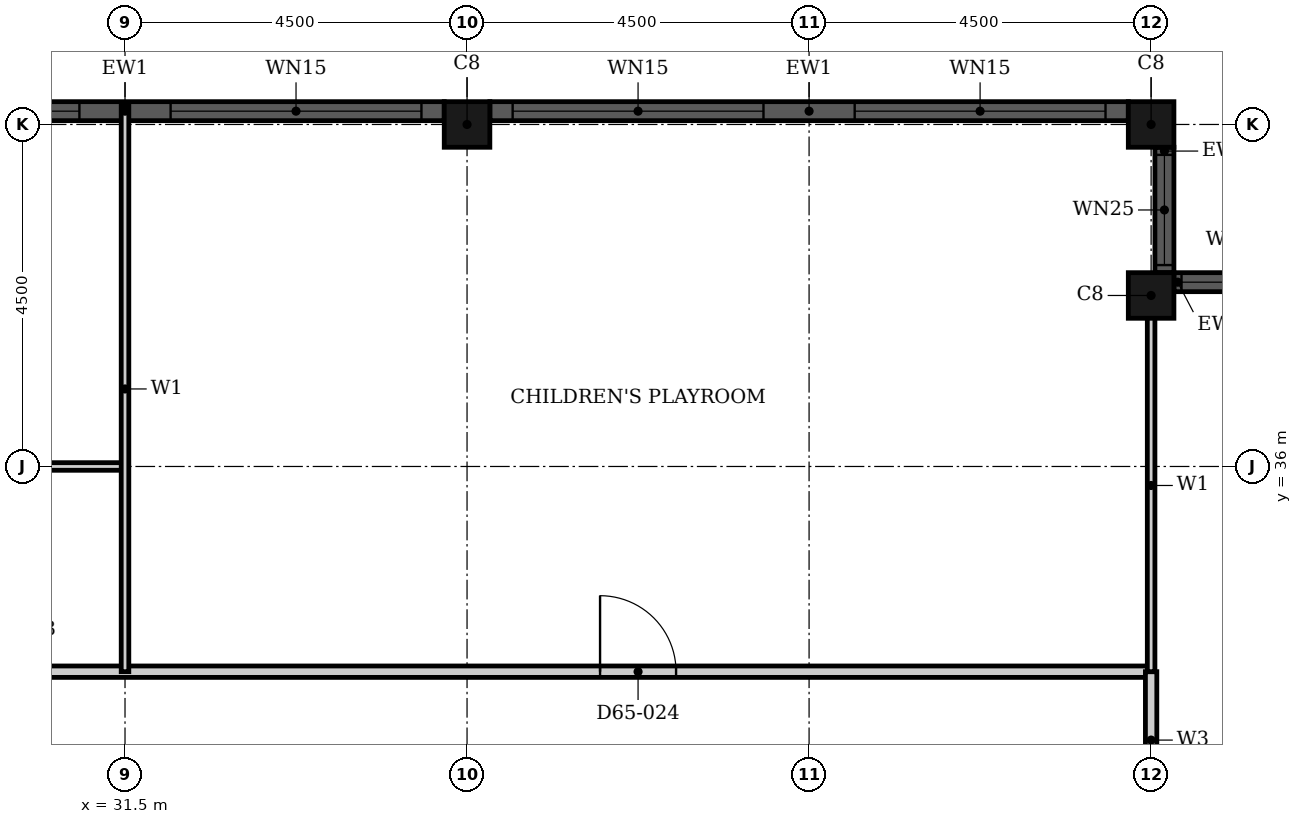
"""IFC4 building model, lengths in metres.
Left out: names, types, materials, properties, quantities, classifications, styles, units other than length and angle.
Written with IfcOpenShell. Run it as: python <this file> out.ifc"""

import sys

from ifc_helpers import new_model, si_unit, direction, frame, frame_2d, origin, origin_2d, place, context, subcontext, project, spatial, rectangle, hollow_rectangle, extrude, element, fill, save


model = new_model("IFC4")
c1 = context("Model", 3, precision=1e-05, world=origin(), true_north=direction((0.0, 1.0)))
c2 = subcontext(c1, "Body", "Model", "MODEL_VIEW")
j1 = project(units=[si_unit("LENGTHUNIT", "METRE"), si_unit("PLANEANGLEUNIT", "RADIAN")], contexts=[c1])
p1 = place(None, origin())
s1 = spatial("IfcSite", under=j1, at=p1, CompositionType="ELEMENT")
p2 = place(p1, origin())
s2 = spatial("IfcBuilding", under=s1, at=p2, CompositionType="ELEMENT")
p3 = place(p2, frame((0.0, 0.0, 256.4)))
s3 = spatial("IfcBuildingStorey", under=s2, at=p3, CompositionType="ELEMENT", Elevation=256.4)
for number, where, z_axis, x_axis in (
    (1, (45.0, 38.25, 0.0), (0.0, 0.0, 1.0), (1.0, 0.0, 0.0)),
    (2, (45.0, 40.5, 0.0), (0.0, 0.0, 1.0), (1.0, 0.0, 0.0)),
    (3, (36.0, 40.5, 0.0), (0.0, 0.0, 1.0), (1.0, 0.0, 0.0)),
):
    element("IfcColumn", number, at=place(p3, frame(where, z_axis=z_axis, x_axis=x_axis)), inside=s3, PredefinedType="COLUMN", context=c2, shape_type="SweptSolid", body=[
        extrude(hollow_rectangle(XDim=0.6, YDim=0.6, WallThickness=0.02, at=origin_2d()), origin(), (0.0, 0.0, 1.0), 3.7),
    ])
p4 = place(p3, frame((46.95, 38.425, 0.0), z_axis=(0.0, 0.0, 1.0), x_axis=(-1.0, 0.0, 0.0)))
e4 = element("IfcWall", 4, at=p4, inside=s3, PredefinedType="SOLIDWALL", context=c2, shape_type="SweptSolid", body=[
    extrude(rectangle(XDim=1.65, YDim=0.25, at=frame_2d((0.825, 0.0))), origin(), (0.0, 0.0, 1.0), 3.7),
])
p5 = place(p4, frame((0.1, 0.0, 0.9)))
e5 = element("IfcOpeningElement", 5, at=p5, cuts=e4, PredefinedType="OPENING", context=c2, shape_type="SweptSolid", body=[
    extrude(rectangle(XDim=1.45, YDim=1.85, at=frame_2d((0.725, 0.925))), frame((0.0, 0.135, 0.0), z_axis=(0.0, -1.0, 0.0), x_axis=(1.0, 0.0, 0.0)), (0.0, 0.0, 1.0), 0.27),
])
p6 = place(p3, frame((45.175, 38.55, 0.0), z_axis=(0.0, 0.0, 1.0), x_axis=(0.0, 1.0, 0.0)))
e6 = element("IfcWall", 6, at=p6, inside=s3, PredefinedType="SOLIDWALL", context=c2, shape_type="SweptSolid", body=[
    extrude(rectangle(XDim=1.65, YDim=0.25, at=frame_2d((0.825, 0.0))), origin(), (0.0, 0.0, 1.0), 3.7),
])
p7 = place(p6, frame((0.1, 0.0, 0.9)))
e7 = element("IfcOpeningElement", 7, at=p7, cuts=e6, PredefinedType="OPENING", context=c2, shape_type="SweptSolid", body=[
    extrude(rectangle(XDim=1.45, YDim=1.85, at=frame_2d((0.725, 0.925))), frame((0.0, 0.135, 0.0), z_axis=(0.0, -1.0, 0.0), x_axis=(1.0, 0.0, 0.0)), (0.0, 0.0, 1.0), 0.27),
])
p8 = place(p3, frame((44.7, 40.675, 0.0), z_axis=(0.0, 0.0, 1.0), x_axis=(-1.0, 0.0, 0.0)))
e8 = element("IfcWall", 8, at=p8, inside=s3, PredefinedType="SOLIDWALL", context=c2, shape_type="SweptSolid", body=[
    extrude(rectangle(XDim=8.4, YDim=0.25, at=frame_2d((4.2, 0.0))), origin(), (0.0, 0.0, 1.0), 3.7),
])
p9 = place(p8, frame((0.3, 0.0, 0.45)))
e9 = element("IfcOpeningElement", 9, at=p9, cuts=e8, PredefinedType="OPENING", context=c2, shape_type="SweptSolid", body=[
    extrude(rectangle(XDim=3.3, YDim=2.3, at=frame_2d((1.65, 1.15))), frame((0.0, 0.135, 0.0), z_axis=(0.0, -1.0, 0.0), x_axis=(1.0, 0.0, 0.0)), (0.0, 0.0, 1.0), 0.27),
])
p10 = place(p8, frame((4.8, 0.0, 0.45)))
e10 = element("IfcOpeningElement", 10, at=p10, cuts=e8, PredefinedType="OPENING", context=c2, shape_type="SweptSolid", body=[
    extrude(rectangle(XDim=3.3, YDim=2.3, at=frame_2d((1.65, 1.15))), frame((0.0, 0.135, 0.0), z_axis=(0.0, -1.0, 0.0), x_axis=(1.0, 0.0, 0.0)), (0.0, 0.0, 1.0), 0.27),
])
p11 = place(p3, frame((35.7, 40.675, 0.0), z_axis=(0.0, 0.0, 1.0), x_axis=(-1.0, 0.0, 0.0)))
e11 = element("IfcWall", 11, at=p11, inside=s3, PredefinedType="SOLIDWALL", context=c2, shape_type="SweptSolid", body=[
    extrude(rectangle(XDim=8.4, YDim=0.25, at=frame_2d((4.2, 0.0))), origin(), (0.0, 0.0, 1.0), 3.7),
])
p12 = place(p11, frame((0.3, 0.0, 0.45)))
e12 = element("IfcOpeningElement", 12, at=p12, cuts=e11, PredefinedType="OPENING", context=c2, shape_type="SweptSolid", body=[
    extrude(rectangle(XDim=3.3, YDim=2.3, at=frame_2d((1.65, 1.15))), frame((0.0, 0.135, 0.0), z_axis=(0.0, -1.0, 0.0), x_axis=(1.0, 0.0, 0.0)), (0.0, 0.0, 1.0), 0.27),
])
p13 = place(p11, frame((4.8, 0.0, 0.45)))
e13 = element("IfcOpeningElement", 13, at=p13, cuts=e11, PredefinedType="OPENING", context=c2, shape_type="SweptSolid", body=[
    extrude(rectangle(XDim=3.3, YDim=2.3, at=frame_2d((1.65, 1.15))), frame((0.0, 0.135, 0.0), z_axis=(0.0, -1.0, 0.0), x_axis=(1.0, 0.0, 0.0)), (0.0, 0.0, 1.0), 0.27),
])
p14 = place(p3, frame((20.4, 33.3, 0.0), z_axis=(0.0, 0.0, 1.0), x_axis=(1.0, 0.0, 0.0)))
e14 = element("IfcWall", 14, at=p14, inside=s3, PredefinedType="PARTITIONING", context=c2, shape_type="SweptSolid", body=[
    extrude(rectangle(XDim=24.6, YDim=0.15, at=frame_2d((12.3, 0.0))), origin(), (0.0, 0.0, 1.0), 3.4),
])
p15 = place(p14, frame((1.6, 0.0, 0.0)))
e15 = element("IfcOpeningElement", 15, at=p15, cuts=e14, PredefinedType="OPENING", context=c2, shape_type="SweptSolid", body=[
    extrude(rectangle(XDim=1.0, YDim=2.2, at=frame_2d((0.5, 1.1))), frame((0.0, 0.085, 0.0), z_axis=(0.0, -1.0, 0.0), x_axis=(1.0, 0.0, 0.0)), (0.0, 0.0, 1.0), 0.17),
])
p16 = place(p14, frame((17.35, 0.0, 0.0)))
e16 = element("IfcOpeningElement", 16, at=p16, cuts=e14, PredefinedType="OPENING", context=c2, shape_type="SweptSolid", body=[
    extrude(rectangle(XDim=1.0, YDim=2.1, at=frame_2d((0.5, 1.05))), frame((0.0, 0.085, 0.0), z_axis=(0.0, -1.0, 0.0), x_axis=(1.0, 0.0, 0.0)), (0.0, 0.0, 1.0), 0.17),
])
p17 = place(p3, frame((45.0, 31.5, 0.0), z_axis=(0.0, 0.0, 1.0), x_axis=(0.0, 1.0, 0.0)))
e17 = element("IfcWall", 17, at=p17, inside=s3, PredefinedType="PARTITIONING", context=c2, shape_type="SweptSolid", body=[
    extrude(rectangle(XDim=1.8, YDim=0.15, at=frame_2d((0.9, 0.0))), origin(), (0.0, 0.0, 1.0), 3.4),
])
p18 = place(p3, frame((24.6, 36.0, 0.0), z_axis=(0.0, 0.0, 1.0), x_axis=(1.0, 0.0, 0.0)))
e18 = element("IfcWall", 18, at=p18, inside=s3, PredefinedType="PARTITIONING", context=c2, shape_type="SweptSolid", body=[
    extrude(rectangle(XDim=6.9, YDim=0.1, at=frame_2d((3.45, 0.0))), origin(), (0.0, 0.0, 1.0), 3.4),
])
p19 = place(p18, frame((4.65, 0.0, 0.0)))
e19 = element("IfcOpeningElement", 19, at=p19, cuts=e18, PredefinedType="OPENING", context=c2, shape_type="SweptSolid", body=[
    extrude(rectangle(XDim=0.9, YDim=2.1, at=frame_2d((0.45, 1.05))), frame((0.0, 0.06, 0.0), z_axis=(0.0, -1.0, 0.0), x_axis=(1.0, 0.0, 0.0)), (0.0, 0.0, 1.0), 0.12),
])
p20 = place(p3, frame((31.5, 33.3, 0.0), z_axis=(0.0, 0.0, 1.0), x_axis=(0.0, 1.0, 0.0)))
e20 = element("IfcWall", 20, at=p20, inside=s3, PredefinedType="PARTITIONING", context=c2, shape_type="SweptSolid", body=[
    extrude(rectangle(XDim=7.44, YDim=0.1, at=frame_2d((3.72, 0.0))), origin(), (0.0, 0.0, 1.0), 3.4),
])
p21 = place(p3, frame((45.0, 33.3, 0.0), z_axis=(0.0, 0.0, 1.0), x_axis=(0.0, 1.0, 0.0)))
e21 = element("IfcWall", 21, at=p21, inside=s3, PredefinedType="PARTITIONING", context=c2, shape_type="SweptSolid", body=[
    extrude(rectangle(XDim=4.9, YDim=0.1, at=frame_2d((2.45, 0.0))), origin(), (0.0, 0.0, 1.0), 3.4),
])
p22 = place(p5, origin())
e22 = element("IfcWindow", 22, at=p22, inside=s3, PartitioningType="SINGLE_PANEL", PredefinedType="WINDOW", context=c2, shape_type="SweptSolid", body=[
    extrude(rectangle(XDim=1.45, YDim=1.85, at=frame_2d((0.725, 0.925))), frame((0.0, 0.03, 0.0), z_axis=(0.0, -1.0, 0.0), x_axis=(1.0, 0.0, 0.0)), (0.0, 0.0, 1.0), 0.06),
])
fill(e5, e22)
p23 = place(p7, origin())
e23 = element("IfcWindow", 23, at=p23, inside=s3, PartitioningType="SINGLE_PANEL", PredefinedType="WINDOW", context=c2, shape_type="SweptSolid", body=[
    extrude(rectangle(XDim=1.45, YDim=1.85, at=frame_2d((0.725, 0.925))), frame((0.0, 0.03, 0.0), z_axis=(0.0, -1.0, 0.0), x_axis=(1.0, 0.0, 0.0)), (0.0, 0.0, 1.0), 0.06),
])
fill(e7, e23)
p24 = place(p9, origin())
e24 = element("IfcWindow", 24, at=p24, inside=s3, PartitioningType="SINGLE_PANEL", PredefinedType="WINDOW", context=c2, shape_type="SweptSolid", body=[
    extrude(rectangle(XDim=3.3, YDim=2.3, at=frame_2d((1.65, 1.15))), frame((0.0, 0.03, 0.0), z_axis=(0.0, -1.0, 0.0), x_axis=(1.0, 0.0, 0.0)), (0.0, 0.0, 1.0), 0.06),
])
fill(e9, e24)
p25 = place(p10, origin())
e25 = element("IfcWindow", 25, at=p25, inside=s3, PartitioningType="SINGLE_PANEL", PredefinedType="WINDOW", context=c2, shape_type="SweptSolid", body=[
    extrude(rectangle(XDim=3.3, YDim=2.3, at=frame_2d((1.65, 1.15))), frame((0.0, 0.03, 0.0), z_axis=(0.0, -1.0, 0.0), x_axis=(1.0, 0.0, 0.0)), (0.0, 0.0, 1.0), 0.06),
])
fill(e10, e25)
p26 = place(p12, origin())
e26 = element("IfcWindow", 26, at=p26, inside=s3, PartitioningType="SINGLE_PANEL", PredefinedType="WINDOW", context=c2, shape_type="SweptSolid", body=[
    extrude(rectangle(XDim=3.3, YDim=2.3, at=frame_2d((1.65, 1.15))), frame((0.0, 0.03, 0.0), z_axis=(0.0, -1.0, 0.0), x_axis=(1.0, 0.0, 0.0)), (0.0, 0.0, 1.0), 0.06),
])
fill(e12, e26)
p27 = place(p13, origin())
e27 = element("IfcWindow", 27, at=p27, inside=s3, PartitioningType="SINGLE_PANEL", PredefinedType="WINDOW", context=c2, shape_type="SweptSolid", body=[
    extrude(rectangle(XDim=3.3, YDim=2.3, at=frame_2d((1.65, 1.15))), frame((0.0, 0.03, 0.0), z_axis=(0.0, -1.0, 0.0), x_axis=(1.0, 0.0, 0.0)), (0.0, 0.0, 1.0), 0.06),
])
fill(e13, e27)
p28 = place(p16, origin())
e28 = element("IfcDoor", 28, at=p28, inside=s3, OperationType="SINGLE_SWING_RIGHT", PredefinedType="DOOR", context=c2, shape_type="SweptSolid", body=[
    extrude(rectangle(XDim=1.0, YDim=2.1, at=frame_2d((0.5, 1.05))), frame((0.0, 0.025, 0.0), z_axis=(0.0, -1.0, 0.0), x_axis=(1.0, 0.0, 0.0)), (0.0, 0.0, 1.0), 0.05),
])
fill(e16, e28)
save(model, sys.argv[1])
